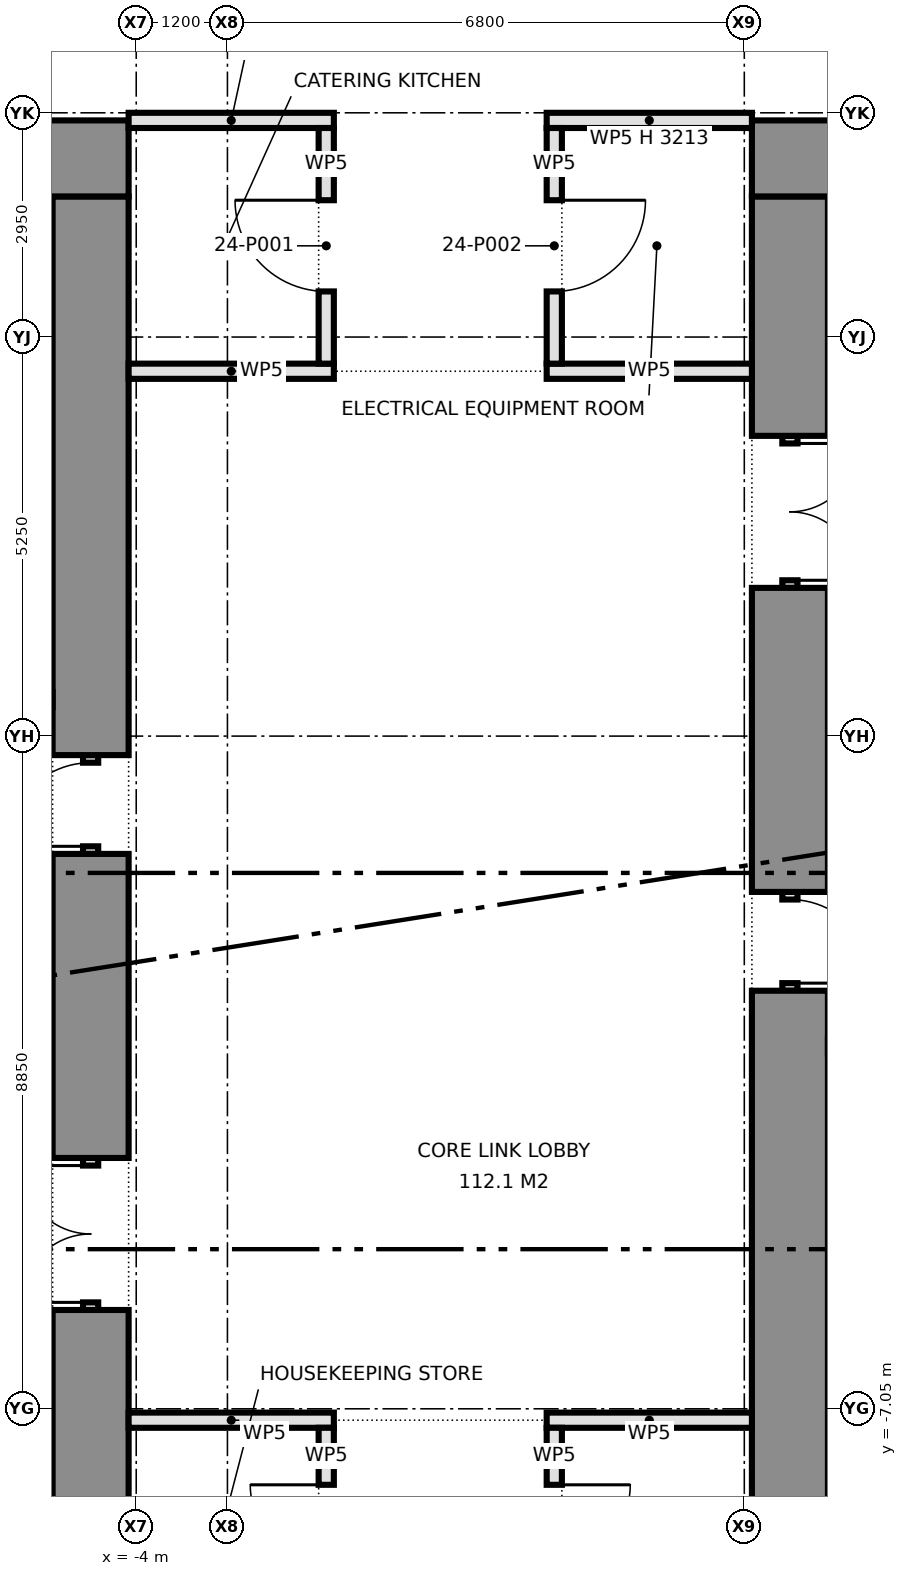
"""IFC4 building model, lengths in metres.
Left out: names, types, materials, properties, quantities, classifications, styles, units other than length and angle.
Written with IfcOpenShell. Run it as: python <this file> out.ifc"""

import sys

from ifc_helpers import new_model, si_unit, direction, frame, frame_2d, origin, place, context, subcontext, project, spatial, rectangle, extrude, element, fill, save


model = new_model("IFC4")
c1 = context("Model", 3, precision=1e-05, world=origin(), true_north=direction((0.0, 1.0)))
c2 = subcontext(c1, "Body", "Model", "MODEL_VIEW")
j1 = project(units=[si_unit("LENGTHUNIT", "METRE"), si_unit("PLANEANGLEUNIT", "RADIAN")], contexts=[c1])
p1 = place(None, origin())
s1 = spatial("IfcSite", under=j1, at=p1, CompositionType="ELEMENT")
p2 = place(p1, origin())
s2 = spatial("IfcBuilding", under=s1, at=p2, CompositionType="ELEMENT")
p3 = place(p2, frame((0.0, 0.0, 108.4)))
s3 = spatial("IfcBuildingStorey", under=s2, at=p3, CompositionType="ELEMENT", Elevation=108.4)
p4 = place(p3, frame((-14.9, 9.4, 0.0), z_axis=(0.0, 0.0, 1.0), x_axis=(1.0, 0.0, 0.0)))
e1 = element("IfcWall", 1, at=p4, inside=s3, PredefinedType="SHEAR", context=c2, shape_type="SweptSolid", body=[
    extrude(rectangle(XDim=10.8, YDim=1.0, at=frame_2d((5.4, 0.0))), origin(), (0.0, 0.0, 1.0), 4.15),
])
p5 = place(p3, frame((-4.6, -8.9, 0.0), z_axis=(0.0, 0.0, 1.0), x_axis=(0.0, 1.0, 0.0)))
e2 = element("IfcWall", 2, at=p5, inside=s3, PredefinedType="SHEAR", context=c2, shape_type="SweptSolid", body=[
    extrude(rectangle(XDim=3.15, YDim=1.0, at=frame_2d((1.575, 0.0))), origin(), (0.0, 0.0, 1.0), 4.15),
])
p6 = place(p3, frame((-4.6, -5.75, 0.0), z_axis=(0.0, 0.0, 1.0), x_axis=(0.0, 1.0, 0.0)))
e3 = element("IfcWall", 3, at=p6, inside=s3, PredefinedType="PARTITIONING", context=c2, shape_type="SweptSolid", body=[
    extrude(rectangle(XDim=2.0, YDim=0.2, at=frame_2d((1.0, 0.0))), origin(), (0.0, 0.0, 1.0), 2.4),
])
p7 = place(p6, frame((0.1, 0.0, 0.0)))
e4 = element("IfcOpeningElement", 4, at=p7, cuts=e3, PredefinedType="OPENING", context=c2, shape_type="SweptSolid", body=[
    extrude(rectangle(XDim=1.8, YDim=2.1, at=frame_2d((0.9, 1.05))), frame((0.0, 0.11, 0.0), z_axis=(0.0, -1.0, 0.0), x_axis=(1.0, 0.0, 0.0)), (0.0, 0.0, 1.0), 0.22),
])
p8 = place(p3, frame((-4.6, -3.75, 0.0), z_axis=(0.0, 0.0, 1.0), x_axis=(0.0, 1.0, 0.0)))
e5 = element("IfcWall", 5, at=p8, inside=s3, PredefinedType="SHEAR", context=c2, shape_type="SweptSolid", body=[
    extrude(rectangle(XDim=4.0, YDim=1.0, at=frame_2d((2.0, 0.0))), origin(), (0.0, 0.0, 1.0), 4.15),
])
p9 = place(p3, frame((-4.6, 0.25, 0.0), z_axis=(0.0, 0.0, 1.0), x_axis=(0.0, 1.0, 0.0)))
e6 = element("IfcWall", 6, at=p9, inside=s3, PredefinedType="PARTITIONING", context=c2, shape_type="SweptSolid", body=[
    extrude(rectangle(XDim=1.3, YDim=0.2, at=frame_2d((0.65, 0.0))), origin(), (0.0, 0.0, 1.0), 2.4),
])
p10 = place(p9, frame((0.1, 0.0, 0.0)))
e7 = element("IfcOpeningElement", 7, at=p10, cuts=e6, PredefinedType="OPENING", context=c2, shape_type="SweptSolid", body=[
    extrude(rectangle(XDim=1.1, YDim=2.1, at=frame_2d((0.55, 1.05))), frame((0.0, 0.11, 0.0), z_axis=(0.0, -1.0, 0.0), x_axis=(1.0, 0.0, 0.0)), (0.0, 0.0, 1.0), 0.22),
])
p11 = place(p3, frame((-4.6, 1.55, 0.0), z_axis=(0.0, 0.0, 1.0), x_axis=(0.0, 1.0, 0.0)))
e8 = element("IfcWall", 8, at=p11, inside=s3, PredefinedType="SHEAR", context=c2, shape_type="SweptSolid", body=[
    extrude(rectangle(XDim=7.35, YDim=1.0, at=frame_2d((3.675, 0.0))), origin(), (0.0, 0.0, 1.0), 4.15),
])
p12 = place(p3, frame((14.9, 9.4, 0.0), z_axis=(0.0, 0.0, 1.0), x_axis=(-1.0, 0.0, 0.0)))
e9 = element("IfcWall", 9, at=p12, inside=s3, PredefinedType="SHEAR", context=c2, shape_type="SweptSolid", body=[
    extrude(rectangle(XDim=10.8, YDim=1.0, at=frame_2d((5.4, 0.0))), origin(), (0.0, 0.0, 1.0), 4.15),
])
p13 = place(p3, frame((4.6, 8.9, 0.0), z_axis=(0.0, 0.0, 1.0), x_axis=(0.0, -1.0, 0.0)))
e10 = element("IfcWall", 10, at=p13, inside=s3, PredefinedType="SHEAR", context=c2, shape_type="SweptSolid", body=[
    extrude(rectangle(XDim=3.15, YDim=1.0, at=frame_2d((1.575, 0.0))), origin(), (0.0, 0.0, 1.0), 4.15),
])
p14 = place(p3, frame((4.6, 5.75, 0.0), z_axis=(0.0, 0.0, 1.0), x_axis=(0.0, -1.0, 0.0)))
e11 = element("IfcWall", 11, at=p14, inside=s3, PredefinedType="PARTITIONING", context=c2, shape_type="SweptSolid", body=[
    extrude(rectangle(XDim=2.0, YDim=0.2, at=frame_2d((1.0, 0.0))), origin(), (0.0, 0.0, 1.0), 2.4),
])
p15 = place(p14, frame((0.1, 0.0, 0.0)))
e12 = element("IfcOpeningElement", 12, at=p15, cuts=e11, PredefinedType="OPENING", context=c2, shape_type="SweptSolid", body=[
    extrude(rectangle(XDim=1.8, YDim=2.1, at=frame_2d((0.9, 1.05))), frame((0.0, 0.11, 0.0), z_axis=(0.0, -1.0, 0.0), x_axis=(1.0, 0.0, 0.0)), (0.0, 0.0, 1.0), 0.22),
])
p16 = place(p3, frame((4.6, 3.75, 0.0), z_axis=(0.0, 0.0, 1.0), x_axis=(0.0, -1.0, 0.0)))
e13 = element("IfcWall", 13, at=p16, inside=s3, PredefinedType="SHEAR", context=c2, shape_type="SweptSolid", body=[
    extrude(rectangle(XDim=4.0, YDim=1.0, at=frame_2d((2.0, 0.0))), origin(), (0.0, 0.0, 1.0), 4.15),
])
p17 = place(p3, frame((4.6, -0.25, 0.0), z_axis=(0.0, 0.0, 1.0), x_axis=(0.0, -1.0, 0.0)))
e14 = element("IfcWall", 14, at=p17, inside=s3, PredefinedType="PARTITIONING", context=c2, shape_type="SweptSolid", body=[
    extrude(rectangle(XDim=1.3, YDim=0.2, at=frame_2d((0.65, 0.0))), origin(), (0.0, 0.0, 1.0), 2.4),
])
p18 = place(p17, frame((0.1, 0.0, 0.0)))
e15 = element("IfcOpeningElement", 15, at=p18, cuts=e14, PredefinedType="OPENING", context=c2, shape_type="SweptSolid", body=[
    extrude(rectangle(XDim=1.1, YDim=2.1, at=frame_2d((0.55, 1.05))), frame((0.0, 0.11, 0.0), z_axis=(0.0, -1.0, 0.0), x_axis=(1.0, 0.0, 0.0)), (0.0, 0.0, 1.0), 0.22),
])
p19 = place(p3, frame((4.6, -1.55, 0.0), z_axis=(0.0, 0.0, 1.0), x_axis=(0.0, -1.0, 0.0)))
e16 = element("IfcWall", 16, at=p19, inside=s3, PredefinedType="SHEAR", context=c2, shape_type="SweptSolid", body=[
    extrude(rectangle(XDim=7.35, YDim=1.0, at=frame_2d((3.675, 0.0))), origin(), (0.0, 0.0, 1.0), 4.15),
])
for number, where, z_axis, x_axis in (
    (17, (-4.1, -7.2, 0.0), (0.0, 0.0, 1.0), (1.0, 0.0, 0.0)),
    (18, (1.4, -7.2, 0.0), (0.0, 0.0, 1.0), (1.0, 0.0, 0.0)),
    (19, (-4.1, 6.6, 0.0), (0.0, 0.0, 1.0), (1.0, 0.0, 0.0)),
    (20, (1.4, 6.6, 0.0), (0.0, 0.0, 1.0), (1.0, 0.0, 0.0)),
):
    element("IfcWall", number, at=place(p3, frame(where, z_axis=z_axis, x_axis=x_axis)), inside=s3, PredefinedType="PARTITIONING", context=c2, shape_type="SweptSolid", body=[
        extrude(rectangle(XDim=2.7, YDim=0.2, at=frame_2d((1.35, 0.0))), origin(), (0.0, 0.0, 1.0), 4.15),
    ])
for number, where, z_axis, x_axis in (
    (21, (-4.1, 9.9, 0.0), (0.0, 0.0, 1.0), (1.0, 0.0, 0.0)),
    (22, (1.4, 9.9, 0.0), (0.0, 0.0, 1.0), (1.0, 0.0, 0.0)),
):
    element("IfcWall", number, at=place(p3, frame(where, z_axis=z_axis, x_axis=x_axis)), inside=s3, PredefinedType="PARTITIONING", context=c2, shape_type="SweptSolid", body=[
        extrude(rectangle(XDim=2.7, YDim=0.2, at=frame_2d((1.35, 0.0))), origin(), (0.0, 0.0, 1.0), 3.213),
    ])
p20 = place(p3, frame((1.5, -9.8, 0.0), z_axis=(0.0, 0.0, 1.0), x_axis=(0.0, 1.0, 0.0)))
e23 = element("IfcWall", 23, at=p20, inside=s3, PredefinedType="PARTITIONING", context=c2, shape_type="SweptSolid", body=[
    extrude(rectangle(XDim=2.5, YDim=0.2, at=frame_2d((1.25, 0.0))), origin(), (0.0, 0.0, 1.0), 4.15),
])
p21 = place(p20, frame((0.75, 0.0, 0.0)))
e24 = element("IfcOpeningElement", 24, at=p21, cuts=e23, PredefinedType="OPENING", context=c2, shape_type="SweptSolid", body=[
    extrude(rectangle(XDim=1.0, YDim=2.1, at=frame_2d((0.5, 1.05))), frame((0.0, 0.11, 0.0), z_axis=(0.0, -1.0, 0.0), x_axis=(1.0, 0.0, 0.0)), (0.0, 0.0, 1.0), 0.22),
])
p22 = place(p3, frame((1.5, 6.7, 0.0), z_axis=(0.0, 0.0, 1.0), x_axis=(0.0, 1.0, 0.0)))
e25 = element("IfcWall", 25, at=p22, inside=s3, PredefinedType="PARTITIONING", context=c2, shape_type="SweptSolid", body=[
    extrude(rectangle(XDim=3.1, YDim=0.2, at=frame_2d((1.55, 0.0))), origin(), (0.0, 0.0, 1.0), 4.15),
])
p23 = place(p22, frame((0.95, 0.0, 0.0)))
e26 = element("IfcOpeningElement", 26, at=p23, cuts=e25, PredefinedType="OPENING", context=c2, shape_type="SweptSolid", body=[
    extrude(rectangle(XDim=1.2, YDim=2.1, at=frame_2d((0.6, 1.05))), frame((0.0, 0.11, 0.0), z_axis=(0.0, -1.0, 0.0), x_axis=(1.0, 0.0, 0.0)), (0.0, 0.0, 1.0), 0.22),
])
p24 = place(p3, frame((-1.5, -9.8, 0.0), z_axis=(0.0, 0.0, 1.0), x_axis=(0.0, 1.0, 0.0)))
e27 = element("IfcWall", 27, at=p24, inside=s3, PredefinedType="PARTITIONING", context=c2, shape_type="SweptSolid", body=[
    extrude(rectangle(XDim=2.5, YDim=0.2, at=frame_2d((1.25, 0.0))), origin(), (0.0, 0.0, 1.0), 4.15),
])
p25 = place(p24, frame((0.75, 0.0, 0.0)))
e28 = element("IfcOpeningElement", 28, at=p25, cuts=e27, PredefinedType="OPENING", context=c2, shape_type="SweptSolid", body=[
    extrude(rectangle(XDim=1.0, YDim=2.1, at=frame_2d((0.5, 1.05))), frame((0.0, 0.11, 0.0), z_axis=(0.0, -1.0, 0.0), x_axis=(1.0, 0.0, 0.0)), (0.0, 0.0, 1.0), 0.22),
])
p26 = place(p3, frame((-1.5, 6.7, 0.0), z_axis=(0.0, 0.0, 1.0), x_axis=(0.0, 1.0, 0.0)))
e29 = element("IfcWall", 29, at=p26, inside=s3, PredefinedType="PARTITIONING", context=c2, shape_type="SweptSolid", body=[
    extrude(rectangle(XDim=3.1, YDim=0.2, at=frame_2d((1.55, 0.0))), origin(), (0.0, 0.0, 1.0), 4.15),
])
p27 = place(p26, frame((0.95, 0.0, 0.0)))
e30 = element("IfcOpeningElement", 30, at=p27, cuts=e29, PredefinedType="OPENING", context=c2, shape_type="SweptSolid", body=[
    extrude(rectangle(XDim=1.2, YDim=2.1, at=frame_2d((0.6, 1.05))), frame((0.0, 0.11, 0.0), z_axis=(0.0, -1.0, 0.0), x_axis=(1.0, 0.0, 0.0)), (0.0, 0.0, 1.0), 0.22),
])
p28 = place(p7, origin())
e31 = element("IfcDoor", 31, at=p28, inside=s3, OperationType="DOUBLE_DOOR_SINGLE_SWING", PredefinedType="DOOR", context=c2, shape_type="SweptSolid", body=[
    extrude(rectangle(XDim=1.8, YDim=2.1, at=frame_2d((0.9, 1.05))), frame((0.0, 0.025, 0.0), z_axis=(0.0, -1.0, 0.0), x_axis=(1.0, 0.0, 0.0)), (0.0, 0.0, 1.0), 0.05),
])
fill(e4, e31)
p29 = place(p10, origin())
e32 = element("IfcDoor", 32, at=p29, inside=s3, OperationType="SINGLE_SWING_LEFT", PredefinedType="DOOR", context=c2, shape_type="SweptSolid", body=[
    extrude(rectangle(XDim=1.1, YDim=2.1, at=frame_2d((0.55, 1.05))), frame((0.0, 0.025, 0.0), z_axis=(0.0, -1.0, 0.0), x_axis=(1.0, 0.0, 0.0)), (0.0, 0.0, 1.0), 0.05),
])
fill(e7, e32)
p30 = place(p15, origin())
e33 = element("IfcDoor", 33, at=p30, inside=s3, OperationType="DOUBLE_DOOR_SINGLE_SWING", PredefinedType="DOOR", context=c2, shape_type="SweptSolid", body=[
    extrude(rectangle(XDim=1.8, YDim=2.1, at=frame_2d((0.9, 1.05))), frame((0.0, 0.025, 0.0), z_axis=(0.0, -1.0, 0.0), x_axis=(1.0, 0.0, 0.0)), (0.0, 0.0, 1.0), 0.05),
])
fill(e12, e33)
p31 = place(p18, origin())
e34 = element("IfcDoor", 34, at=p31, inside=s3, OperationType="SINGLE_SWING_RIGHT", PredefinedType="DOOR", context=c2, shape_type="SweptSolid", body=[
    extrude(rectangle(XDim=1.1, YDim=2.1, at=frame_2d((0.55, 1.05))), frame((0.0, 0.025, 0.0), z_axis=(0.0, -1.0, 0.0), x_axis=(1.0, 0.0, 0.0)), (0.0, 0.0, 1.0), 0.05),
])
fill(e15, e34)
p32 = place(p27, origin())
e35 = element("IfcDoor", 35, at=p32, inside=s3, OperationType="SINGLE_SWING_RIGHT", PredefinedType="DOOR", context=c2, shape_type="SweptSolid", body=[
    extrude(rectangle(XDim=1.2, YDim=2.1, at=frame_2d((0.6, 1.05))), frame((0.0, 0.025, 0.0), z_axis=(0.0, -1.0, 0.0), x_axis=(1.0, 0.0, 0.0)), (0.0, 0.0, 1.0), 0.05),
])
fill(e30, e35)
p33 = place(p23, frame((1.2, 0.0, 0.0), z_axis=(0.0, 0.0, 1.0), x_axis=(-1.0, 0.0, 0.0)))
e36 = element("IfcDoor", 36, at=p33, inside=s3, OperationType="SINGLE_SWING_LEFT", PredefinedType="DOOR", context=c2, shape_type="SweptSolid", body=[
    extrude(rectangle(XDim=1.2, YDim=2.1, at=frame_2d((0.6, 1.05))), frame((0.0, 0.025, 0.0), z_axis=(0.0, -1.0, 0.0), x_axis=(1.0, 0.0, 0.0)), (0.0, 0.0, 1.0), 0.05),
])
fill(e26, e36)
p34 = place(p25, origin())
e37 = element("IfcDoor", 37, at=p34, inside=s3, OperationType="SINGLE_SWING_RIGHT", PredefinedType="DOOR", context=c2, shape_type="SweptSolid", body=[
    extrude(rectangle(XDim=1.0, YDim=2.1, at=frame_2d((0.5, 1.05))), frame((0.0, 0.025, 0.0), z_axis=(0.0, -1.0, 0.0), x_axis=(1.0, 0.0, 0.0)), (0.0, 0.0, 1.0), 0.05),
])
fill(e28, e37)
p35 = place(p21, frame((1.0, 0.0, 0.0), z_axis=(0.0, 0.0, 1.0), x_axis=(-1.0, 0.0, 0.0)))
e38 = element("IfcDoor", 38, at=p35, inside=s3, OperationType="SINGLE_SWING_LEFT", PredefinedType="DOOR", context=c2, shape_type="SweptSolid", body=[
    extrude(rectangle(XDim=1.0, YDim=2.1, at=frame_2d((0.5, 1.05))), frame((0.0, 0.025, 0.0), z_axis=(0.0, -1.0, 0.0), x_axis=(1.0, 0.0, 0.0)), (0.0, 0.0, 1.0), 0.05),
])
fill(e24, e38)
save(model, sys.argv[1])
